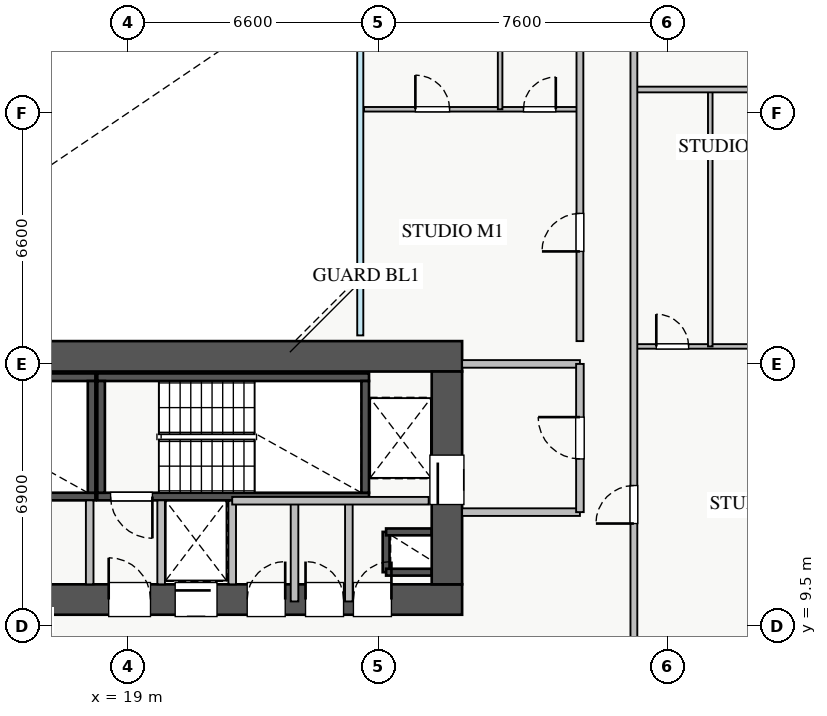
"""IFC4 building model, lengths in metres.
Left out: names, types, materials, properties, quantities, classifications, styles, units other than length and angle.
Written with IfcOpenShell. Run it as: python <this file> out.ifc"""

import sys

from ifc_helpers import new_model, si_unit, direction, frame, frame_2d, origin, place, context, subcontext, project, spatial, rectangle, extrude, source, transform, mapped, element, fill, save


model = new_model("IFC4")
c1 = context("Model", 3, precision=1e-05, world=origin(), true_north=direction((0.0, 1.0)))
c2 = subcontext(c1, "Body", "Model", "MODEL_VIEW")
j1 = project(units=[si_unit("LENGTHUNIT", "METRE"), si_unit("PLANEANGLEUNIT", "RADIAN")], contexts=[c1])
p1 = place(None, origin())
s1 = spatial("IfcSite", under=j1, at=p1, CompositionType="ELEMENT")
p2 = place(p1, origin())
s2 = spatial("IfcBuilding", under=s1, at=p2, CompositionType="ELEMENT")
p3 = place(p2, frame((0.0, 0.0, 76.25)))
s3 = spatial("IfcBuildingStorey", under=s2, at=p3, CompositionType="ELEMENT", Elevation=76.25)
p4 = place(p3, frame((25.8, 10.92, 0.0), z_axis=(0.0, 0.0, 1.0), x_axis=(0.0, 1.0, 0.0)))
e1 = element("IfcWall", 1, at=p4, inside=s3, PredefinedType="SHEAR", context=c2, shape_type="SweptSolid", body=[
    extrude(rectangle(XDim=1.06, YDim=0.18, at=frame_2d((0.53, 0.0))), origin(), (0.0, 0.0, 1.0), 3.07),
])
for number, where, z_axis, x_axis in (
    (2, (25.8, 11.98, 0.0), (0.0, 0.0, 1.0), (1.0, 0.0, 0.0)),
    (3, (25.8, 10.92, 0.0), (0.0, 0.0, 1.0), (1.0, 0.0, 0.0)),
):
    element("IfcWall", number, at=place(p3, frame(where, z_axis=z_axis, x_axis=x_axis)), inside=s3, PredefinedType="SHEAR", context=c2, shape_type="SweptSolid", body=[
        extrude(rectangle(XDim=1.2, YDim=0.18, at=frame_2d((0.6, 0.0))), origin(), (0.0, 0.0, 1.0), 3.07),
    ])
p5 = place(p3, frame((19.88, 12.8, 0.0), z_axis=(0.0, 0.0, 1.0), x_axis=(1.0, 0.0, 0.0)))
e4 = element("IfcWall", 4, at=p5, inside=s3, PredefinedType="SHEAR", context=c2, shape_type="SweptSolid", body=[
    extrude(rectangle(XDim=1.87, YDim=0.18, at=frame_2d((0.935, 0.0))), origin(), (0.0, 0.0, 1.0), 3.07),
])
p6 = place(p3, frame((11.0, 12.91, 0.0), z_axis=(0.0, 0.0, 1.0), x_axis=(1.0, 0.0, 0.0)))
e5 = element("IfcWall", 5, at=p6, inside=s3, PredefinedType="SHEAR", context=c2, shape_type="SweptSolid", body=[
    extrude(rectangle(XDim=7.15, YDim=0.2, at=frame_2d((3.575, 0.0))), origin(), (0.0, 0.0, 1.0), 3.25),
])
p7 = place(p6, frame((0.35, 0.0, 0.0)))
e6 = element("IfcOpeningElement", 6, at=p7, cuts=e5, PredefinedType="OPENING", context=c2, shape_type="SweptSolid", body=[
    extrude(rectangle(XDim=1.1, YDim=2.05, at=frame_2d((0.55, 1.025))), frame((0.0, 0.11, 0.0), z_axis=(0.0, -1.0, 0.0), x_axis=(1.0, 0.0, 0.0)), (0.0, 0.0, 1.0), 0.22),
])
p8 = place(p3, frame((11.0, 16.05, 0.0), z_axis=(0.0, 0.0, 1.0), x_axis=(1.0, 0.0, 0.0)))
e7 = element("IfcWall", 7, at=p8, inside=s3, PredefinedType="SHEAR", context=c2, shape_type="SweptSolid", body=[
    extrude(rectangle(XDim=7.15, YDim=0.2, at=frame_2d((3.575, 0.0))), origin(), (0.0, 0.0, 1.0), 3.25),
])
p9 = place(p3, frame((18.05, 13.01, 0.0), z_axis=(0.0, 0.0, 1.0), x_axis=(0.0, 1.0, 0.0)))
e8 = element("IfcWall", 8, at=p9, inside=s3, PredefinedType="SHEAR", context=c2, shape_type="SweptSolid", body=[
    extrude(rectangle(XDim=2.94, YDim=0.2, at=frame_2d((1.47, 0.0))), origin(), (0.0, 0.0, 1.0), 3.25),
])
p10 = place(p3, frame((18.2, 12.91, 0.0), z_axis=(0.0, 0.0, 1.0), x_axis=(1.0, 0.0, 0.0)))
e9 = element("IfcWall", 9, at=p10, inside=s3, PredefinedType="SHEAR", context=c2, shape_type="SweptSolid", body=[
    extrude(rectangle(XDim=7.15, YDim=0.2, at=frame_2d((3.575, 0.0))), origin(), (0.0, 0.0, 1.0), 3.25),
])
p11 = place(p10, frame((0.35, 0.0, 0.0)))
e10 = element("IfcOpeningElement", 10, at=p11, cuts=e9, PredefinedType="OPENING", context=c2, shape_type="SweptSolid", body=[
    extrude(rectangle(XDim=1.1, YDim=2.05, at=frame_2d((0.55, 1.025))), frame((0.0, 0.11, 0.0), z_axis=(0.0, -1.0, 0.0), x_axis=(1.0, 0.0, 0.0)), (0.0, 0.0, 1.0), 0.22),
])
p12 = place(p3, frame((18.2, 16.05, 0.0), z_axis=(0.0, 0.0, 1.0), x_axis=(1.0, 0.0, 0.0)))
e11 = element("IfcWall", 11, at=p12, inside=s3, PredefinedType="SHEAR", context=c2, shape_type="SweptSolid", body=[
    extrude(rectangle(XDim=7.15, YDim=0.2, at=frame_2d((3.575, 0.0))), origin(), (0.0, 0.0, 1.0), 3.25),
])
for number, where, z_axis, x_axis in (
    (12, (18.3, 13.01, 0.0), (0.0, 0.0, 1.0), (0.0, 1.0, 0.0)),
    (13, (25.25, 13.01, 0.0), (0.0, 0.0, 1.0), (0.0, 1.0, 0.0)),
):
    element("IfcWall", number, at=place(p3, frame(where, z_axis=z_axis, x_axis=x_axis)), inside=s3, PredefinedType="SHEAR", context=c2, shape_type="SweptSolid", body=[
        extrude(rectangle(XDim=2.94, YDim=0.2, at=frame_2d((1.47, 0.0))), origin(), (0.0, 0.0, 1.0), 3.25),
    ])
p13 = place(p3, frame((10.2, 10.2, 0.0), z_axis=(0.0, 0.0, 1.0), x_axis=(1.0, 0.0, 0.0)))
e14 = element("IfcWall", 14, at=p13, inside=s3, PredefinedType="SHEAR", context=c2, shape_type="SweptSolid", body=[
    extrude(rectangle(XDim=17.6, YDim=0.8, at=frame_2d((8.8, 0.0))), origin(), (0.0, 0.0, 1.0), 3.25),
])
p14 = place(p13, frame((1.15, 0.0, 0.0)))
e15 = element("IfcOpeningElement", 15, at=p14, cuts=e14, PredefinedType="OPENING", context=c2, shape_type="SweptSolid", body=[
    extrude(rectangle(XDim=1.1, YDim=2.05, at=frame_2d((0.55, 1.025))), frame((0.0, 0.41, 0.0), z_axis=(0.0, -1.0, 0.0), x_axis=(1.0, 0.0, 0.0)), (0.0, 0.0, 1.0), 0.82),
])
p15 = place(p13, frame((8.3, 0.0, 0.0)))
e16 = element("IfcOpeningElement", 16, at=p15, cuts=e14, PredefinedType="OPENING", context=c2, shape_type="SweptSolid", body=[
    extrude(rectangle(XDim=1.1, YDim=2.05, at=frame_2d((0.55, 1.025))), frame((0.0, 0.41, 0.0), z_axis=(0.0, -1.0, 0.0), x_axis=(1.0, 0.0, 0.0)), (0.0, 0.0, 1.0), 0.82),
])
p16 = place(p13, frame((10.05, 0.0, 0.0)))
e17 = element("IfcOpeningElement", 17, at=p16, cuts=e14, PredefinedType="OPENING", context=c2, shape_type="SweptSolid", body=[
    extrude(rectangle(XDim=1.1, YDim=2.05, at=frame_2d((0.55, 1.025))), frame((0.0, 0.41, 0.0), z_axis=(0.0, -1.0, 0.0), x_axis=(1.0, 0.0, 0.0)), (0.0, 0.0, 1.0), 0.82),
])
p17 = place(p13, frame((14.74, 0.0, 0.0)))
e18 = element("IfcOpeningElement", 18, at=p17, cuts=e14, PredefinedType="OPENING", context=c2, shape_type="SweptSolid", body=[
    extrude(rectangle(XDim=1.0, YDim=2.05, at=frame_2d((0.5, 1.025))), frame((0.0, 0.41, 0.0), z_axis=(0.0, -1.0, 0.0), x_axis=(1.0, 0.0, 0.0)), (0.0, 0.0, 1.0), 0.82),
])
p18 = place(p13, frame((11.945, 0.0, 0.0)))
e19 = element("IfcOpeningElement", 19, at=p18, cuts=e14, PredefinedType="OPENING", context=c2, shape_type="SweptSolid", body=[
    extrude(rectangle(XDim=1.0, YDim=2.05, at=frame_2d((0.5, 1.025))), frame((0.0, 0.41, 0.0), z_axis=(0.0, -1.0, 0.0), x_axis=(1.0, 0.0, 0.0)), (0.0, 0.0, 1.0), 0.82),
])
p19 = place(p13, frame((13.48, 0.0, 0.0)))
e20 = element("IfcOpeningElement", 20, at=p19, cuts=e14, PredefinedType="OPENING", context=c2, shape_type="SweptSolid", body=[
    extrude(rectangle(XDim=1.0, YDim=2.05, at=frame_2d((0.5, 1.025))), frame((0.0, 0.41, 0.0), z_axis=(0.0, -1.0, 0.0), x_axis=(1.0, 0.0, 0.0)), (0.0, 0.0, 1.0), 0.82),
])
p20 = place(p3, frame((10.2, 16.6, 0.0), z_axis=(0.0, 0.0, 1.0), x_axis=(1.0, 0.0, 0.0)))
e21 = element("IfcWall", 21, at=p20, inside=s3, PredefinedType="SHEAR", context=c2, shape_type="SweptSolid", body=[
    extrude(rectangle(XDim=17.6, YDim=0.8, at=frame_2d((8.8, 0.0))), origin(), (0.0, 0.0, 1.0), 3.25),
])
p21 = place(p3, frame((27.4, 10.6, 0.0), z_axis=(0.0, 0.0, 1.0), x_axis=(0.0, 1.0, 0.0)))
e22 = element("IfcWall", 22, at=p21, inside=s3, PredefinedType="SHEAR", context=c2, shape_type="SweptSolid", body=[
    extrude(rectangle(XDim=5.6, YDim=0.8, at=frame_2d((2.8, 0.0))), origin(), (0.0, 0.0, 1.0), 3.25),
])
p22 = place(p21, frame((2.1, 0.0, 0.0)))
e23 = element("IfcOpeningElement", 23, at=p22, cuts=e22, PredefinedType="OPENING", context=c2, shape_type="SweptSolid", body=[
    extrude(rectangle(XDim=1.3, YDim=2.05, at=frame_2d((0.65, 1.025))), frame((0.0, 0.41, 0.0), z_axis=(0.0, -1.0, 0.0), x_axis=(1.0, 0.0, 0.0)), (0.0, 0.0, 1.0), 0.82),
])
for number, where, z_axis, x_axis in (
    (24, (27.8, 16.4, 0.0), (0.0, 0.0, 1.0), (1.0, 0.0, 0.0)),
    (25, (27.8, 12.5, 0.0), (0.0, 0.0, 1.0), (1.0, 0.0, 0.0)),
):
    element("IfcWall", number, at=place(p3, frame(where, z_axis=z_axis, x_axis=x_axis)), inside=s3, PredefinedType="PARTITIONING", context=c2, shape_type="SweptSolid", body=[
        extrude(rectangle(XDim=3.1, YDim=0.2, at=frame_2d((1.55, 0.0))), origin(), (0.0, 0.0, 1.0), 3.07),
    ])
p23 = place(p3, frame((30.9, 12.5, 0.0), z_axis=(0.0, 0.0, 1.0), x_axis=(0.0, 1.0, 0.0)))
e26 = element("IfcWall", 26, at=p23, inside=s3, PredefinedType="PARTITIONING", context=c2, shape_type="SweptSolid", body=[
    extrude(rectangle(XDim=3.9, YDim=0.2, at=frame_2d((1.95, 0.0))), origin(), (0.0, 0.0, 1.0), 3.07),
])
p24 = place(p23, frame((1.4, 0.0, 0.0)))
e27 = element("IfcOpeningElement", 27, at=p24, cuts=e26, PredefinedType="OPENING", context=c2, shape_type="SweptSolid", body=[
    extrude(rectangle(XDim=1.1, YDim=2.05, at=frame_2d((0.55, 1.025))), frame((0.0, 0.11, 0.0), z_axis=(0.0, -1.0, 0.0), x_axis=(1.0, 0.0, 0.0)), (0.0, 0.0, 1.0), 0.22),
])
for number, where, z_axis, x_axis in (
    (28, (18.0, 10.6, 0.0), (0.0, 0.0, 1.0), (0.0, 1.0, 0.0)),
    (29, (19.88, 10.6, 0.0), (0.0, 0.0, 1.0), (0.0, 1.0, 0.0)),
):
    element("IfcWall", number, at=place(p3, frame(where, z_axis=z_axis, x_axis=x_axis)), inside=s3, PredefinedType="PARTITIONING", context=c2, shape_type="SweptSolid", body=[
        extrude(rectangle(XDim=2.21, YDim=0.2, at=frame_2d((1.105, 0.0))), origin(), (0.0, 0.0, 1.0), 3.07),
    ])
p25 = place(p3, frame((24.82, 10.15, 0.0), z_axis=(0.0, 0.0, 1.0), x_axis=(0.0, 1.0, 0.0)))
e30 = element("IfcWall", 30, at=p25, inside=s3, PredefinedType="PARTITIONING", context=c2, shape_type="SweptSolid", body=[
    extrude(rectangle(XDim=2.65, YDim=0.2, at=frame_2d((1.325, 0.0))), origin(), (0.0, 0.0, 1.0), 3.07),
])
p26 = place(p3, frame((21.75, 10.6, 0.0), z_axis=(0.0, 0.0, 1.0), x_axis=(0.0, 1.0, 0.0)))
e31 = element("IfcWall", 31, at=p26, inside=s3, PredefinedType="PARTITIONING", context=c2, shape_type="SweptSolid", body=[
    extrude(rectangle(XDim=2.2, YDim=0.2, at=frame_2d((1.1, 0.0))), origin(), (0.0, 0.0, 1.0), 3.07),
])
p27 = place(p3, frame((23.39, 10.15, 0.0), z_axis=(0.0, 0.0, 1.0), x_axis=(0.0, 1.0, 0.0)))
e32 = element("IfcWall", 32, at=p27, inside=s3, PredefinedType="PARTITIONING", context=c2, shape_type="SweptSolid", body=[
    extrude(rectangle(XDim=2.65, YDim=0.2, at=frame_2d((1.325, 0.0))), origin(), (0.0, 0.0, 1.0), 3.07),
])
p28 = place(p3, frame((21.75, 12.8, 0.0), z_axis=(0.0, 0.0, 1.0), x_axis=(1.0, 0.0, 0.0)))
e33 = element("IfcWall", 33, at=p28, inside=s3, PredefinedType="PARTITIONING", context=c2, shape_type="SweptSolid", body=[
    extrude(rectangle(XDim=5.17, YDim=0.2, at=frame_2d((2.585, 0.0))), origin(), (0.0, 0.0, 1.0), 3.07),
])
p29 = place(p3, frame((32.32, 16.86, 0.0), z_axis=(0.0, 0.0, 1.0), x_axis=(1.0, 0.0, 0.0)))
e34 = element("IfcWall", 34, at=p29, inside=s3, PredefinedType="PLUMBINGWALL", context=c2, shape_type="SweptSolid", body=[
    extrude(rectangle(XDim=5.43, YDim=0.12, at=frame_2d((2.715, 0.0))), origin(), (0.0, 0.0, 1.0), 3.07),
])
p30 = place(p29, frame((0.59, 0.0, 0.0)))
e35 = element("IfcOpeningElement", 35, at=p30, cuts=e34, PredefinedType="OPENING", context=c2, shape_type="SweptSolid", body=[
    extrude(rectangle(XDim=0.85, YDim=2.05, at=frame_2d((0.425, 1.025))), frame((0.0, 0.07, 0.0), z_axis=(0.0, -1.0, 0.0), x_axis=(1.0, 0.0, 0.0)), (0.0, 0.0, 1.0), 0.14),
])
p31 = place(p29, frame((3.26, 0.0, 0.0)))
e36 = element("IfcOpeningElement", 36, at=p31, cuts=e34, PredefinedType="OPENING", context=c2, shape_type="SweptSolid", body=[
    extrude(rectangle(XDim=0.9, YDim=2.05, at=frame_2d((0.45, 1.025))), frame((0.0, 0.07, 0.0), z_axis=(0.0, -1.0, 0.0), x_axis=(1.0, 0.0, 0.0)), (0.0, 0.0, 1.0), 0.14),
])
p32 = place(p3, frame((34.33, 16.86, 0.0), z_axis=(0.0, 0.0, 1.0), x_axis=(0.0, 1.0, 0.0)))
e37 = element("IfcWall", 37, at=p32, inside=s3, PredefinedType="PLUMBINGWALL", context=c2, shape_type="SweptSolid", body=[
    extrude(rectangle(XDim=6.76, YDim=0.12, at=frame_2d((3.38, 0.0))), origin(), (0.0, 0.0, 1.0), 3.07),
])
p33 = place(p3, frame((32.32, 23.62, 0.0), z_axis=(0.0, 0.0, 1.0), x_axis=(1.0, 0.0, 0.0)))
e38 = element("IfcWall", 38, at=p33, inside=s3, PredefinedType="PARTITIONING", context=c2, shape_type="SweptSolid", body=[
    extrude(rectangle(XDim=5.43, YDim=0.15, at=frame_2d((2.715, 0.0))), origin(), (0.0, 0.0, 1.0), 3.07),
])
p34 = place(p3, frame((32.32, 7.21, 0.0), z_axis=(0.0, 0.0, 1.0), x_axis=(0.0, 1.0, 0.0)))
e39 = element("IfcWall", 39, at=p34, inside=s3, PredefinedType="PARTITIONING", context=c2, shape_type="SweptSolid", body=[
    extrude(rectangle(XDim=31.23, YDim=0.18, at=frame_2d((15.615, 0.0))), origin(), (0.0, 0.0, 1.0), 2.815),
])
p35 = place(p34, frame((30.09, 0.0, 0.0)))
e40 = element("IfcOpeningElement", 40, at=p35, cuts=e39, PredefinedType="OPENING", context=c2, shape_type="SweptSolid", body=[
    extrude(rectangle(XDim=0.9, YDim=2.05, at=frame_2d((0.45, 1.025))), frame((0.0, 0.1, 0.0), z_axis=(0.0, -1.0, 0.0), x_axis=(1.0, 0.0, 0.0)), (0.0, 0.0, 1.0), 0.2),
])
p36 = place(p34, frame((0.415, 0.0, 0.0)))
e41 = element("IfcOpeningElement", 41, at=p36, cuts=e39, PredefinedType="OPENING", context=c2, shape_type="SweptSolid", body=[
    extrude(rectangle(XDim=0.9, YDim=2.05, at=frame_2d((0.45, 1.025))), frame((0.0, 0.1, 0.0), z_axis=(0.0, -1.0, 0.0), x_axis=(1.0, 0.0, 0.0)), (0.0, 0.0, 1.0), 0.2),
])
p37 = place(p34, frame((4.99, 0.0, 0.0)))
e42 = element("IfcOpeningElement", 42, at=p37, cuts=e39, PredefinedType="OPENING", context=c2, shape_type="SweptSolid", body=[
    extrude(rectangle(XDim=1.0, YDim=2.05, at=frame_2d((0.5, 1.025))), frame((0.0, 0.1, 0.0), z_axis=(0.0, -1.0, 0.0), x_axis=(1.0, 0.0, 0.0)), (0.0, 0.0, 1.0), 0.2),
])
p38 = place(p34, frame((19.355, 0.0, 0.0)))
e43 = element("IfcOpeningElement", 43, at=p38, cuts=e39, PredefinedType="OPENING", context=c2, shape_type="SweptSolid", body=[
    extrude(rectangle(XDim=1.0, YDim=2.05, at=frame_2d((0.5, 1.025))), frame((0.0, 0.1, 0.0), z_axis=(0.0, -1.0, 0.0), x_axis=(1.0, 0.0, 0.0)), (0.0, 0.0, 1.0), 0.2),
])
p39 = place(p3, frame((25.22, 23.1, 0.0), z_axis=(0.0, 0.0, 1.0), x_axis=(1.0, 0.0, 0.0)))
e44 = element("IfcWall", 44, at=p39, inside=s3, PredefinedType="PLUMBINGWALL", context=c2, shape_type="SweptSolid", body=[
    extrude(rectangle(XDim=5.68, YDim=0.12, at=frame_2d((2.84, 0.0))), origin(), (0.0, 0.0, 1.0), 3.07),
])
p40 = place(p39, frame((1.35, 0.0, 0.0)))
e45 = element("IfcOpeningElement", 45, at=p40, cuts=e44, PredefinedType="OPENING", context=c2, shape_type="SweptSolid", body=[
    extrude(rectangle(XDim=0.9, YDim=2.05, at=frame_2d((0.45, 1.025))), frame((0.0, 0.07, 0.0), z_axis=(0.0, -1.0, 0.0), x_axis=(1.0, 0.0, 0.0)), (0.0, 0.0, 1.0), 0.14),
])
p41 = place(p39, frame((4.195, 0.0, 0.0)))
e46 = element("IfcOpeningElement", 46, at=p41, cuts=e44, PredefinedType="OPENING", context=c2, shape_type="SweptSolid", body=[
    extrude(rectangle(XDim=0.85, YDim=2.05, at=frame_2d((0.425, 1.025))), frame((0.0, 0.07, 0.0), z_axis=(0.0, -1.0, 0.0), x_axis=(1.0, 0.0, 0.0)), (0.0, 0.0, 1.0), 0.14),
])
p42 = place(p3, frame((28.8, 23.1, 0.0), z_axis=(0.0, 0.0, 1.0), x_axis=(0.0, 1.0, 0.0)))
e47 = element("IfcWall", 47, at=p42, inside=s3, PredefinedType="PLUMBINGWALL", context=c2, shape_type="SweptSolid", body=[
    extrude(rectangle(XDim=5.9, YDim=0.12, at=frame_2d((2.95, 0.0))), origin(), (0.0, 0.0, 1.0), 3.07),
])
p43 = place(p3, frame((30.9, 17.0, 0.0), z_axis=(0.0, 0.0, 1.0), x_axis=(0.0, 1.0, 0.0)))
e48 = element("IfcWall", 48, at=p43, inside=s3, PredefinedType="PARTITIONING", context=c2, shape_type="SweptSolid", body=[
    extrude(rectangle(XDim=12.0, YDim=0.18, at=frame_2d((6.0, 0.0))), origin(), (0.0, 0.0, 1.0), 3.07),
])
p44 = place(p43, frame((2.36, 0.0, 0.0)))
e49 = element("IfcOpeningElement", 49, at=p44, cuts=e48, PredefinedType="OPENING", context=c2, shape_type="SweptSolid", body=[
    extrude(rectangle(XDim=1.0, YDim=2.05, at=frame_2d((0.5, 1.025))), frame((0.0, 0.1, 0.0), z_axis=(0.0, -1.0, 0.0), x_axis=(1.0, 0.0, 0.0)), (0.0, 0.0, 1.0), 0.2),
])
m1 = source(origin(), c2, "Body", "SweptSolid", [
    extrude(rectangle(XDim=1.3, YDim=2.05, at=frame_2d((0.65, 1.025))), frame((0.0, 0.025, 0.0), z_axis=(0.0, -1.0, 0.0), x_axis=(1.0, 0.0, 0.0)), (0.0, 0.0, 1.0), 0.05),
])
p45 = place(p22, origin())
e50 = element("IfcDoor", 50, at=p45, inside=s3, OperationType="SLIDING_TO_RIGHT", PredefinedType="DOOR", context=c2, shape_type="MappedRepresentation", body=[
    mapped(m1, transform((0.0, 0.0, 0.0), x_axis=(1.0, 0.0, 0.0), y_axis=(0.0, 1.0, 0.0), z_axis=(0.0, 0.0, 1.0), scale=1.0)),
])
fill(e23, e50)
m2 = source(origin(), c2, "Body", "SweptSolid", [
    extrude(rectangle(XDim=1.1, YDim=2.05, at=frame_2d((0.55, 1.025))), frame((0.0, 0.025, 0.0), z_axis=(0.0, -1.0, 0.0), x_axis=(1.0, 0.0, 0.0)), (0.0, 0.0, 1.0), 0.05),
])
p46 = place(p15, origin())
e51 = element("IfcDoor", 51, at=p46, inside=s3, OperationType="SINGLE_SWING_LEFT", PredefinedType="DOOR", context=c2, shape_type="MappedRepresentation", body=[
    mapped(m2, transform((0.0, 0.0, 0.0), x_axis=(1.0, 0.0, 0.0), y_axis=(0.0, 1.0, 0.0), z_axis=(0.0, 0.0, 1.0), scale=1.0)),
])
fill(e16, e51)
p47 = place(p11, frame((1.1, 0.0, 0.0), z_axis=(0.0, 0.0, 1.0), x_axis=(-1.0, 0.0, 0.0)))
e52 = element("IfcDoor", 52, at=p47, inside=s3, OperationType="SINGLE_SWING_RIGHT", PredefinedType="DOOR", context=c2, shape_type="MappedRepresentation", body=[
    mapped(m2, transform((0.0, 0.0, 0.0), x_axis=(1.0, 0.0, 0.0), y_axis=(0.0, 1.0, 0.0), z_axis=(0.0, 0.0, 1.0), scale=1.0)),
])
fill(e10, e52)
p48 = place(p16, origin())
e53 = element("IfcDoor", 53, at=p48, inside=s3, OperationType="SLIDING_TO_RIGHT", PredefinedType="DOOR", context=c2, shape_type="MappedRepresentation", body=[
    mapped(m2, transform((0.0, 0.0, 0.0), x_axis=(1.0, 0.0, 0.0), y_axis=(0.0, 1.0, 0.0), z_axis=(0.0, 0.0, 1.0), scale=1.0)),
])
fill(e17, e53)
m3 = source(origin(), c2, "Body", "SweptSolid", [
    extrude(rectangle(XDim=1.0, YDim=2.05, at=frame_2d((0.5, 1.025))), frame((0.0, 0.025, 0.0), z_axis=(0.0, -1.0, 0.0), x_axis=(1.0, 0.0, 0.0)), (0.0, 0.0, 1.0), 0.05),
])
p49 = place(p17, origin())
e54 = element("IfcDoor", 54, at=p49, inside=s3, OperationType="SINGLE_SWING_RIGHT", PredefinedType="DOOR", context=c2, shape_type="MappedRepresentation", body=[
    mapped(m3, transform((0.0, 0.0, 0.0), x_axis=(1.0, 0.0, 0.0), y_axis=(0.0, 1.0, 0.0), z_axis=(0.0, 0.0, 1.0), scale=1.0)),
])
fill(e18, e54)
p50 = place(p18, origin())
e55 = element("IfcDoor", 55, at=p50, inside=s3, OperationType="SINGLE_SWING_RIGHT", PredefinedType="DOOR", context=c2, shape_type="MappedRepresentation", body=[
    mapped(m3, transform((0.0, 0.0, 0.0), x_axis=(1.0, 0.0, 0.0), y_axis=(0.0, 1.0, 0.0), z_axis=(0.0, 0.0, 1.0), scale=1.0)),
])
fill(e19, e55)
p51 = place(p19, origin())
e56 = element("IfcDoor", 56, at=p51, inside=s3, OperationType="SINGLE_SWING_LEFT", PredefinedType="DOOR", context=c2, shape_type="MappedRepresentation", body=[
    mapped(m3, transform((0.0, 0.0, 0.0), x_axis=(1.0, 0.0, 0.0), y_axis=(0.0, 1.0, 0.0), z_axis=(0.0, 0.0, 1.0), scale=1.0)),
])
fill(e20, e56)
p52 = place(p24, origin())
e57 = element("IfcDoor", 57, at=p52, inside=s3, OperationType="SINGLE_SWING_RIGHT", PredefinedType="DOOR", context=c2, shape_type="MappedRepresentation", body=[
    mapped(m2, transform((0.0, 0.0, 0.0), x_axis=(1.0, 0.0, 0.0), y_axis=(0.0, 1.0, 0.0), z_axis=(0.0, 0.0, 1.0), scale=1.0)),
])
fill(e27, e57)
m4 = source(origin(), c2, "Body", "SweptSolid", [
    extrude(rectangle(XDim=0.85, YDim=2.05, at=frame_2d((0.425, 1.025))), frame((0.0, 0.025, 0.0), z_axis=(0.0, -1.0, 0.0), x_axis=(1.0, 0.0, 0.0)), (0.0, 0.0, 1.0), 0.05),
])
p53 = place(p30, origin())
e58 = element("IfcDoor", 58, at=p53, inside=s3, OperationType="SINGLE_SWING_LEFT", PredefinedType="DOOR", context=c2, shape_type="MappedRepresentation", body=[
    mapped(m4, transform((0.0, 0.0, 0.0), x_axis=(1.0, 0.0, 0.0), y_axis=(0.0, 1.0, 0.0), z_axis=(0.0, 0.0, 1.0), scale=1.0)),
])
fill(e35, e58)
p54 = place(p37, origin())
e59 = element("IfcDoor", 59, at=p54, inside=s3, OperationType="SINGLE_SWING_LEFT", PredefinedType="DOOR", context=c2, shape_type="MappedRepresentation", body=[
    mapped(m3, transform((0.0, 0.0, 0.0), x_axis=(1.0, 0.0, 0.0), y_axis=(0.0, 1.0, 0.0), z_axis=(0.0, 0.0, 1.0), scale=1.0)),
])
fill(e42, e59)
m5 = source(origin(), c2, "Body", "SweptSolid", [
    extrude(rectangle(XDim=0.9, YDim=2.05, at=frame_2d((0.45, 1.025))), frame((0.0, 0.025, 0.0), z_axis=(0.0, -1.0, 0.0), x_axis=(1.0, 0.0, 0.0)), (0.0, 0.0, 1.0), 0.05),
])
p55 = place(p40, origin())
e60 = element("IfcDoor", 60, at=p55, inside=s3, OperationType="SINGLE_SWING_LEFT", PredefinedType="DOOR", context=c2, shape_type="MappedRepresentation", body=[
    mapped(m5, transform((0.0, 0.0, 0.0), x_axis=(1.0, 0.0, 0.0), y_axis=(0.0, 1.0, 0.0), z_axis=(0.0, 0.0, 1.0), scale=1.0)),
])
fill(e45, e60)
p56 = place(p41, origin())
e61 = element("IfcDoor", 61, at=p56, inside=s3, OperationType="SINGLE_SWING_RIGHT", PredefinedType="DOOR", context=c2, shape_type="MappedRepresentation", body=[
    mapped(m4, transform((0.0, 0.0, 0.0), x_axis=(1.0, 0.0, 0.0), y_axis=(0.0, 1.0, 0.0), z_axis=(0.0, 0.0, 1.0), scale=1.0)),
])
fill(e46, e61)
p57 = place(p44, origin())
e62 = element("IfcDoor", 62, at=p57, inside=s3, OperationType="SINGLE_SWING_LEFT", PredefinedType="DOOR", context=c2, shape_type="MappedRepresentation", body=[
    mapped(m3, transform((0.0, 0.0, 0.0), x_axis=(1.0, 0.0, 0.0), y_axis=(0.0, 1.0, 0.0), z_axis=(0.0, 0.0, 1.0), scale=1.0)),
])
fill(e49, e62)
save(model, sys.argv[1])
